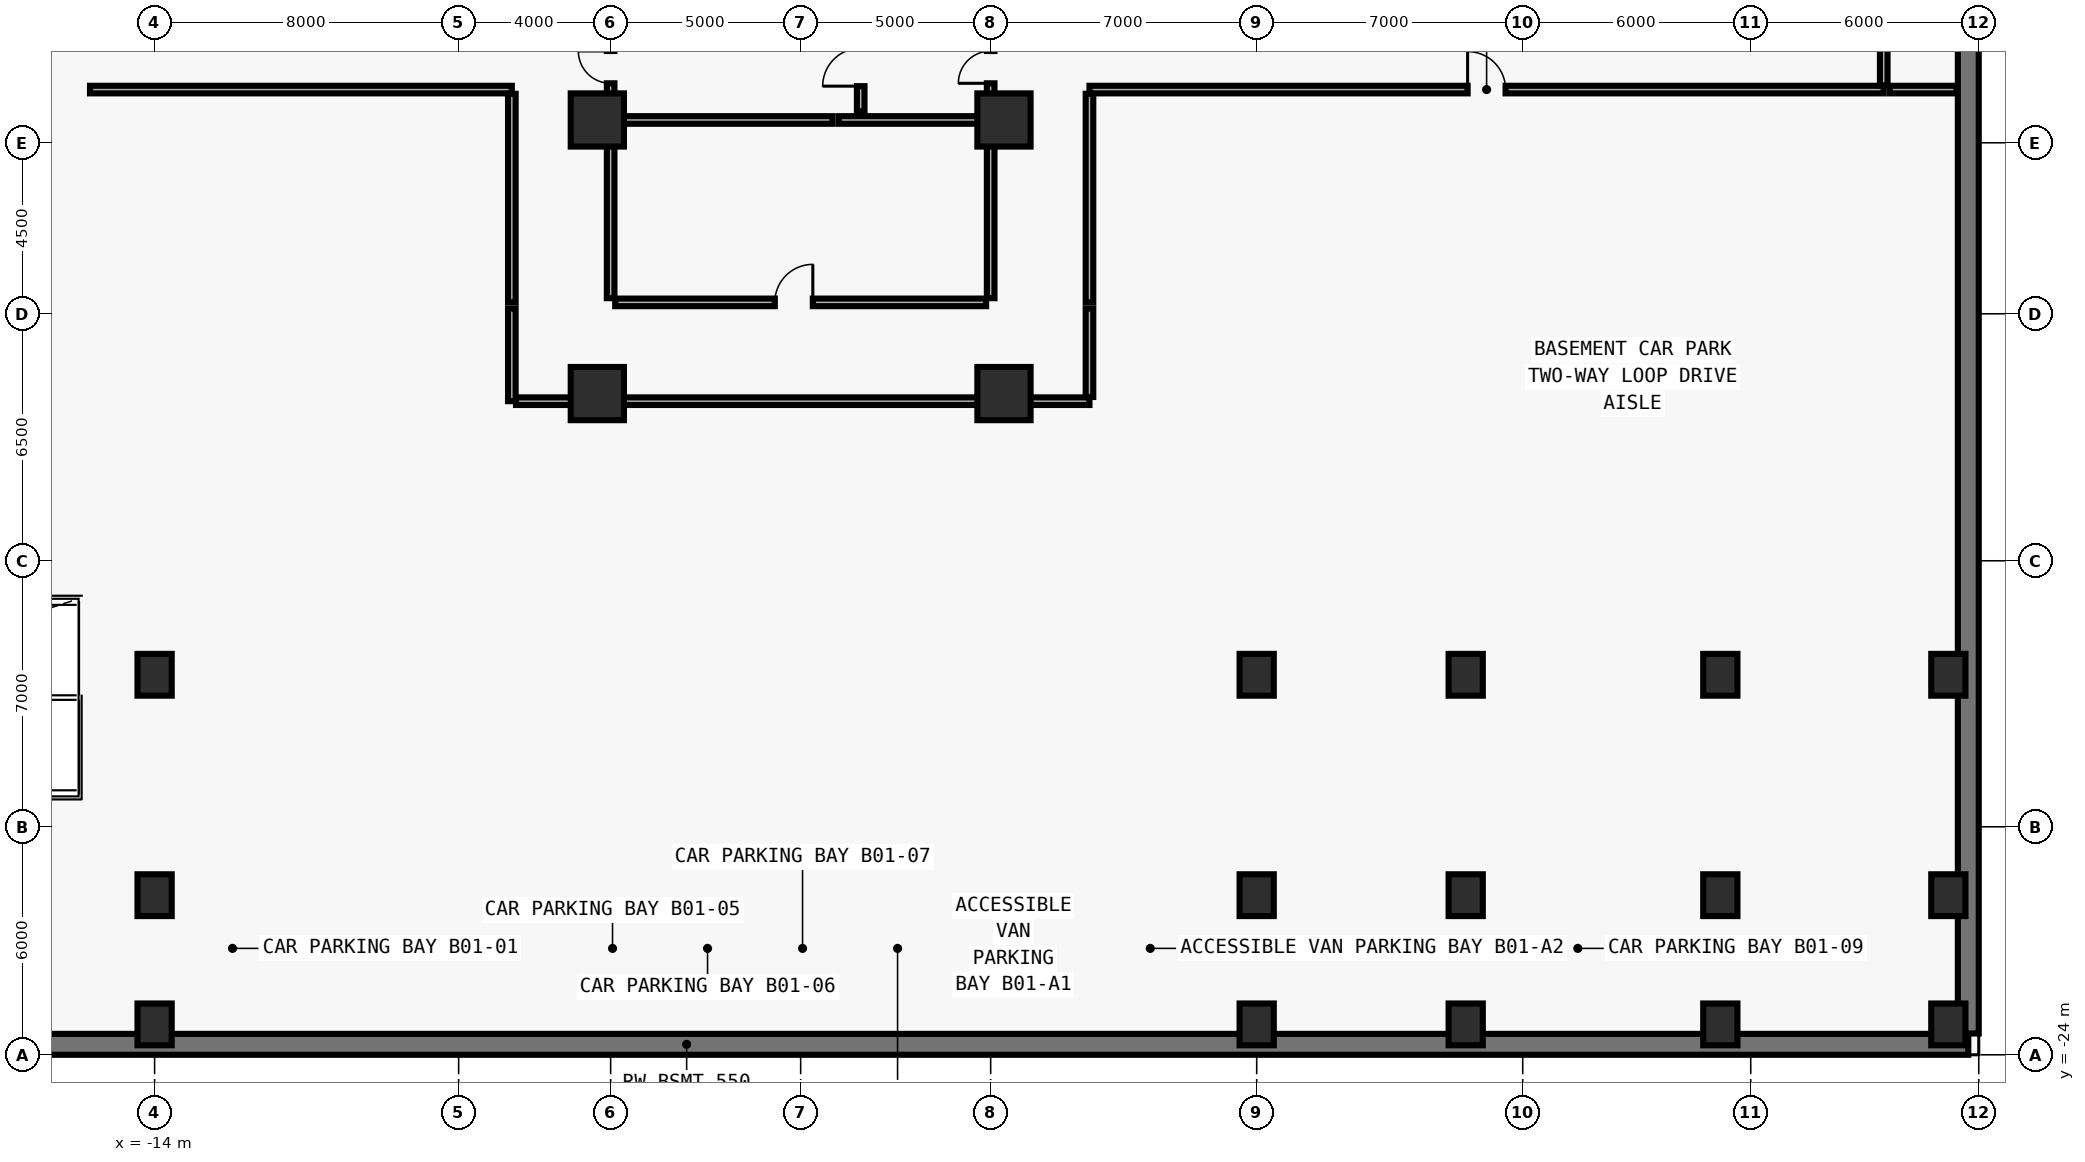
"""IFC4 building model, lengths in metres.
Left out: names, types, materials, properties, quantities, classifications, styles, units other than length and angle.
Written with IfcOpenShell. Run it as: python <this file> out.ifc"""

import sys

from ifc_helpers import new_model, si_unit, direction, frame, frame_2d, origin, origin_2d, place, context, subcontext, project, spatial, rectangle, extrude, element, fill, save


model = new_model("IFC4")
c1 = context("Model", 3, precision=1e-05, world=origin(), true_north=direction((0.0, 1.0)))
c2 = subcontext(c1, "Body", "Model", "MODEL_VIEW")
j1 = project(units=[si_unit("LENGTHUNIT", "METRE"), si_unit("PLANEANGLEUNIT", "RADIAN")], contexts=[c1])
p1 = place(None, origin())
s1 = spatial("IfcSite", under=j1, at=p1, CompositionType="ELEMENT")
p2 = place(p1, origin())
s2 = spatial("IfcBuilding", under=s1, at=p2, CompositionType="ELEMENT")
p3 = place(p2, frame((0.0, 0.0, -4.5)))
s3 = spatial("IfcBuildingStorey", under=s2, at=p3, CompositionType="ELEMENT", Elevation=-4.5)
p4 = place(p3, frame((-33.725, -23.725, 0.0), z_axis=(0.0, 0.0, 1.0), x_axis=(1.0, 0.0, 0.0)))
e1 = element("IfcWall", 1, at=p4, inside=s3, PredefinedType="SOLIDWALL", context=c2, shape_type="SweptSolid", body=[
    extrude(rectangle(XDim=67.45, YDim=0.55, at=frame_2d((33.725, 0.0))), origin(), (0.0, 0.0, 1.0), 4.492),
])
p5 = place(p3, frame((33.725, -23.44, 0.0), z_axis=(0.0, 0.0, 1.0), x_axis=(0.0, 1.0, 0.0)))
e2 = element("IfcWall", 2, at=p5, inside=s3, PredefinedType="SOLIDWALL", context=c2, shape_type="SweptSolid", body=[
    extrude(rectangle(XDim=46.88, YDim=0.55, at=frame_2d((23.44, 0.0))), origin(), (0.0, 0.0, 1.0), 4.492),
])
for number, where, z_axis, x_axis in (
    (3, (-2.35, 0.6, 0.0), (0.0, 0.0, 1.0), (1.0, 0.0, 0.0)),
    (4, (8.35, 0.6, 0.0), (0.0, 0.0, 1.0), (1.0, 0.0, 0.0)),
    (5, (-2.35, -6.6, 0.0), (0.0, 0.0, 1.0), (1.0, 0.0, 0.0)),
    (6, (8.35, -6.6, 0.0), (0.0, 0.0, 1.0), (1.0, 0.0, 0.0)),
):
    element("IfcColumn", number, at=place(p3, frame(where, z_axis=z_axis, x_axis=x_axis)), inside=s3, PredefinedType="COLUMN", context=c2, shape_type="SweptSolid", body=[
        extrude(rectangle(XDim=1.4, YDim=1.4, at=origin_2d()), origin(), (0.0, 0.0, 1.0), 4.475),
    ])
for number, where, z_axis, x_axis in (
    (7, (-14.0, -23.2, 0.0), (0.0, 0.0, 1.0), (1.0, 0.0, 0.0)),
    (8, (-14.0, -19.8, 0.0), (0.0, 0.0, 1.0), (1.0, 0.0, 0.0)),
    (9, (-14.0, -14.0, 0.0), (0.0, 0.0, 1.0), (1.0, 0.0, 0.0)),
    (10, (15.0, -23.2, 0.0), (0.0, 0.0, 1.0), (1.0, 0.0, 0.0)),
    (11, (15.0, -19.8, 0.0), (0.0, 0.0, 1.0), (1.0, 0.0, 0.0)),
    (12, (15.0, -14.0, 0.0), (0.0, 0.0, 1.0), (1.0, 0.0, 0.0)),
    (13, (20.5, -23.2, 0.0), (0.0, 0.0, 1.0), (1.0, 0.0, 0.0)),
    (14, (20.5, -19.8, 0.0), (0.0, 0.0, 1.0), (1.0, 0.0, 0.0)),
    (15, (20.5, -14.0, 0.0), (0.0, 0.0, 1.0), (1.0, 0.0, 0.0)),
    (16, (27.2, -23.2, 0.0), (0.0, 0.0, 1.0), (1.0, 0.0, 0.0)),
    (17, (27.2, -19.8, 0.0), (0.0, 0.0, 1.0), (1.0, 0.0, 0.0)),
    (18, (27.2, -14.0, 0.0), (0.0, 0.0, 1.0), (1.0, 0.0, 0.0)),
    (19, (33.2, -23.2, 0.0), (0.0, 0.0, 1.0), (1.0, 0.0, 0.0)),
    (20, (33.2, -19.8, 0.0), (0.0, 0.0, 1.0), (1.0, 0.0, 0.0)),
    (21, (33.2, -14.0, 0.0), (0.0, 0.0, 1.0), (1.0, 0.0, 0.0)),
):
    element("IfcColumn", number, at=place(p3, frame(where, z_axis=z_axis, x_axis=x_axis)), inside=s3, PredefinedType="COLUMN", context=c2, shape_type="SweptSolid", body=[
        extrude(rectangle(XDim=0.9, YDim=1.1, at=origin_2d()), origin(), (0.0, 0.0, 1.0), 4.475),
    ])
p6 = place(p3, frame((4.0, 0.6, 0.0), z_axis=(0.0, 0.0, 1.0), x_axis=(1.0, 0.0, 0.0)))
e22 = element("IfcWall", 22, at=p6, inside=s3, PredefinedType="SOLIDWALL", context=c2, shape_type="SweptSolid", body=[
    extrude(rectangle(XDim=3.88, YDim=0.2, at=frame_2d((1.94, 0.0))), origin(), (0.0, 0.0, 1.0), 3.362),
])
p7 = place(p3, frame((4.58, 0.83, 0.0), z_axis=(0.0, 0.0, 1.0), x_axis=(0.0, 1.0, 0.0)))
e23 = element("IfcWall", 23, at=p7, inside=s3, PredefinedType="MOVABLE", context=c2, shape_type="SweptSolid", body=[
    extrude(rectangle(XDim=2.14, YDim=0.2, at=frame_2d((1.07, 0.0))), origin(), (0.0, 0.0, 1.0), 4.18),
])
p8 = place(p7, frame((0.66, 0.0, 0.0)))
e24 = element("IfcOpeningElement", 24, at=p8, cuts=e23, PredefinedType="OPENING", context=c2, shape_type="SweptSolid", body=[
    extrude(rectangle(XDim=1.0, YDim=2.1, at=frame_2d((0.5, 1.05))), frame((0.0, 0.11, 0.0), z_axis=(0.0, -1.0, 0.0), x_axis=(1.0, 0.0, 0.0)), (0.0, 0.0, 1.0), 0.22),
])
p9 = place(p3, frame((-2.0, 0.72, 0.0), z_axis=(0.0, 0.0, 1.0), x_axis=(0.0, 1.0, 0.0)))
e25 = element("IfcWall", 25, at=p9, inside=s3, PredefinedType="MOVABLE", context=c2, shape_type="SweptSolid", body=[
    extrude(rectangle(XDim=2.25, YDim=0.2, at=frame_2d((1.125, 0.0))), origin(), (0.0, 0.0, 1.0), 3.262),
])
p10 = place(p9, frame((0.845, 0.0, 0.0)))
e26 = element("IfcOpeningElement", 26, at=p10, cuts=e25, PredefinedType="OPENING", context=c2, shape_type="SweptSolid", body=[
    extrude(rectangle(XDim=0.85, YDim=2.1, at=frame_2d((0.425, 1.05))), frame((0.0, 0.11, 0.0), z_axis=(0.0, -1.0, 0.0), x_axis=(1.0, 0.0, 0.0)), (0.0, 0.0, 1.0), 0.22),
])
p11 = place(p3, frame((8.0, 0.72, 0.0), z_axis=(0.0, 0.0, 1.0), x_axis=(0.0, 1.0, 0.0)))
e27 = element("IfcWall", 27, at=p11, inside=s3, PredefinedType="MOVABLE", context=c2, shape_type="SweptSolid", body=[
    extrude(rectangle(XDim=2.25, YDim=0.2, at=frame_2d((1.125, 0.0))), origin(), (0.0, 0.0, 1.0), 3.262),
])
p12 = place(p11, frame((0.845, 0.0, 0.0)))
e28 = element("IfcOpeningElement", 28, at=p12, cuts=e27, PredefinedType="OPENING", context=c2, shape_type="SweptSolid", body=[
    extrude(rectangle(XDim=0.85, YDim=2.1, at=frame_2d((0.425, 1.05))), frame((0.0, 0.11, 0.0), z_axis=(0.0, -1.0, 0.0), x_axis=(1.0, 0.0, 0.0)), (0.0, 0.0, 1.0), 0.22),
])
p13 = place(p3, frame((-1.88, -4.2, 0.0), z_axis=(0.0, 0.0, 1.0), x_axis=(1.0, 0.0, 0.0)))
e29 = element("IfcWall", 29, at=p13, inside=s3, PredefinedType="MOVABLE", context=c2, shape_type="SweptSolid", body=[
    extrude(rectangle(XDim=9.76, YDim=0.2, at=frame_2d((4.88, 0.0))), origin(), (0.0, 0.0, 1.0), 4.18),
])
p14 = place(p13, frame((4.2, 0.0, 0.0)))
e30 = element("IfcOpeningElement", 30, at=p14, cuts=e29, PredefinedType="OPENING", context=c2, shape_type="SweptSolid", body=[
    extrude(rectangle(XDim=1.0, YDim=2.1, at=frame_2d((0.5, 1.05))), frame((0.0, 0.11, 0.0), z_axis=(0.0, -1.0, 0.0), x_axis=(1.0, 0.0, 0.0)), (0.0, 0.0, 1.0), 0.22),
])
p15 = place(p3, frame((10.6, 1.4, 0.0), z_axis=(0.0, 0.0, 1.0), x_axis=(1.0, 0.0, 0.0)))
e31 = element("IfcWall", 31, at=p15, inside=s3, PredefinedType="MOVABLE", context=c2, shape_type="SweptSolid", body=[
    extrude(rectangle(XDim=20.9, YDim=0.2, at=frame_2d((10.45, 0.0))), origin(), (0.0, 0.0, 1.0), 4.18),
])
p16 = place(p15, frame((9.95, 0.0, 0.0)))
e32 = element("IfcOpeningElement", 32, at=p16, cuts=e31, PredefinedType="OPENING", context=c2, shape_type="SweptSolid", body=[
    extrude(rectangle(XDim=1.0, YDim=2.1, at=frame_2d((0.5, 1.05))), frame((0.0, 0.11, 0.0), z_axis=(0.0, -1.0, 0.0), x_axis=(1.0, 0.0, 0.0)), (0.0, 0.0, 1.0), 0.22),
])
p17 = place(p3, frame((-1.88, 0.6, 0.0), z_axis=(0.0, 0.0, 1.0), x_axis=(1.0, 0.0, 0.0)))
e33 = element("IfcWall", 33, at=p17, inside=s3, PredefinedType="MOVABLE", context=c2, shape_type="SweptSolid", body=[
    extrude(rectangle(XDim=5.72, YDim=0.2, at=frame_2d((2.86, 0.0))), origin(), (0.0, 0.0, 1.0), 3.362),
])
for number, where, z_axis, x_axis in (
    (34, (-2.0, -4.09, 0.0), (0.0, 0.0, 1.0), (0.0, 1.0, 0.0)),
    (35, (8.0, -4.09, 0.0), (0.0, 0.0, 1.0), (0.0, 1.0, 0.0)),
):
    element("IfcWall", number, at=place(p3, frame(where, z_axis=z_axis, x_axis=x_axis)), inside=s3, PredefinedType="MOVABLE", context=c2, shape_type="SweptSolid", body=[
        extrude(rectangle(XDim=4.59, YDim=0.2, at=frame_2d((2.295, 0.0))), origin(), (0.0, 0.0, 1.0), 3.362),
    ])
p18 = place(p3, frame((-15.7, 1.4, 0.0), z_axis=(0.0, 0.0, 1.0), x_axis=(1.0, 0.0, 0.0)))
e36 = element("IfcWall", 36, at=p18, inside=s3, PredefinedType="MOVABLE", context=c2, shape_type="SweptSolid", body=[
    extrude(rectangle(XDim=11.1, YDim=0.2, at=frame_2d((5.55, 0.0))), origin(), (0.0, 0.0, 1.0), 4.18),
])
p19 = place(p3, frame((-2.0, -6.8, 0.0), z_axis=(0.0, 0.0, 1.0), x_axis=(1.0, 0.0, 0.0)))
e37 = element("IfcWall", 37, at=p19, inside=s3, PredefinedType="MOVABLE", context=c2, shape_type="SweptSolid", body=[
    extrude(rectangle(XDim=10.0, YDim=0.2, at=frame_2d((5.0, 0.0))), origin(), (0.0, 0.0, 1.0), 3.362),
])
for number, where, z_axis, x_axis in (
    (38, (-4.6, 1.29, 0.0), (0.0, 0.0, 1.0), (0.0, -1.0, 0.0)),
    (39, (10.6, -4.2, 0.0), (0.0, 0.0, 1.0), (0.0, 1.0, 0.0)),
):
    element("IfcWall", number, at=place(p3, frame(where, z_axis=z_axis, x_axis=x_axis)), inside=s3, PredefinedType="MOVABLE", context=c2, shape_type="SweptSolid", body=[
        extrude(rectangle(XDim=5.49, YDim=0.2, at=frame_2d((2.745, 0.0))), origin(), (0.0, 0.0, 1.0), 4.18),
    ])
p20 = place(p3, frame((-4.6, -4.36, 0.0), z_axis=(0.0, 0.0, 1.0), x_axis=(0.0, -1.0, 0.0)))
e40 = element("IfcWall", 40, at=p20, inside=s3, PredefinedType="MOVABLE", context=c2, shape_type="SweptSolid", body=[
    extrude(rectangle(XDim=2.44, YDim=0.2, at=frame_2d((1.22, 0.0))), origin(), (0.0, 0.0, 1.0), 4.18),
])
p21 = place(p3, frame((-4.49, -6.8, 0.0), z_axis=(0.0, 0.0, 1.0), x_axis=(1.0, 0.0, 0.0)))
e41 = element("IfcWall", 41, at=p21, inside=s3, PredefinedType="MOVABLE", context=c2, shape_type="SweptSolid", body=[
    extrude(rectangle(XDim=2.33, YDim=0.2, at=frame_2d((1.165, 0.0))), origin(), (0.0, 0.0, 1.0), 4.18),
])
p22 = place(p3, frame((8.16, -6.8, 0.0), z_axis=(0.0, 0.0, 1.0), x_axis=(1.0, 0.0, 0.0)))
e42 = element("IfcWall", 42, at=p22, inside=s3, PredefinedType="MOVABLE", context=c2, shape_type="SweptSolid", body=[
    extrude(rectangle(XDim=2.44, YDim=0.2, at=frame_2d((1.22, 0.0))), origin(), (0.0, 0.0, 1.0), 4.18),
])
p23 = place(p3, frame((10.6, -6.69, 0.0), z_axis=(0.0, 0.0, 1.0), x_axis=(0.0, 1.0, 0.0)))
e43 = element("IfcWall", 43, at=p23, inside=s3, PredefinedType="MOVABLE", context=c2, shape_type="SweptSolid", body=[
    extrude(rectangle(XDim=2.33, YDim=0.2, at=frame_2d((1.165, 0.0))), origin(), (0.0, 0.0, 1.0), 4.18),
])
p24 = place(p3, frame((31.5, 1.51, 0.0), z_axis=(0.0, 0.0, 1.0), x_axis=(0.0, 1.0, 0.0)))
e44 = element("IfcWall", 44, at=p24, inside=s3, PredefinedType="MOVABLE", context=c2, shape_type="SweptSolid", body=[
    extrude(rectangle(XDim=2.18, YDim=0.2, at=frame_2d((1.09, 0.0))), origin(), (0.0, 0.0, 1.0), 4.18),
])
p25 = place(p3, frame((31.66, 1.4, 0.0), z_axis=(0.0, 0.0, 1.0), x_axis=(1.0, 0.0, 0.0)))
e45 = element("IfcWall", 45, at=p25, inside=s3, PredefinedType="MOVABLE", context=c2, shape_type="SweptSolid", body=[
    extrude(rectangle(XDim=1.755, YDim=0.2, at=frame_2d((0.877, 0.0))), origin(), (0.0, 0.0, 1.0), 4.18),
])
p26 = place(p8, origin())
e46 = element("IfcDoor", 46, at=p26, inside=s3, OperationType="SINGLE_SWING_LEFT", PredefinedType="DOOR", context=c2, shape_type="SweptSolid", body=[
    extrude(rectangle(XDim=1.0, YDim=2.1, at=frame_2d((0.5, 1.05))), frame((0.0, 0.025, 0.0), z_axis=(0.0, -1.0, 0.0), x_axis=(1.0, 0.0, 0.0)), (0.0, 0.0, 1.0), 0.05),
])
fill(e24, e46)
p27 = place(p10, origin())
e47 = element("IfcDoor", 47, at=p27, inside=s3, OperationType="SINGLE_SWING_RIGHT", PredefinedType="DOOR", context=c2, shape_type="SweptSolid", body=[
    extrude(rectangle(XDim=0.85, YDim=2.1, at=frame_2d((0.425, 1.05))), frame((0.0, 0.025, 0.0), z_axis=(0.0, -1.0, 0.0), x_axis=(1.0, 0.0, 0.0)), (0.0, 0.0, 1.0), 0.05),
])
fill(e26, e47)
p28 = place(p12, origin())
e48 = element("IfcDoor", 48, at=p28, inside=s3, OperationType="SINGLE_SWING_LEFT", PredefinedType="DOOR", context=c2, shape_type="SweptSolid", body=[
    extrude(rectangle(XDim=0.85, YDim=2.1, at=frame_2d((0.425, 1.05))), frame((0.0, 0.025, 0.0), z_axis=(0.0, -1.0, 0.0), x_axis=(1.0, 0.0, 0.0)), (0.0, 0.0, 1.0), 0.05),
])
fill(e28, e48)
p29 = place(p14, origin())
e49 = element("IfcDoor", 49, at=p29, inside=s3, OperationType="SINGLE_SWING_RIGHT", PredefinedType="DOOR", context=c2, shape_type="SweptSolid", body=[
    extrude(rectangle(XDim=1.0, YDim=2.1, at=frame_2d((0.5, 1.05))), frame((0.0, 0.025, 0.0), z_axis=(0.0, -1.0, 0.0), x_axis=(1.0, 0.0, 0.0)), (0.0, 0.0, 1.0), 0.05),
])
fill(e30, e49)
p30 = place(p16, origin())
e50 = element("IfcDoor", 50, at=p30, inside=s3, OperationType="SINGLE_SWING_LEFT", PredefinedType="DOOR", context=c2, shape_type="SweptSolid", body=[
    extrude(rectangle(XDim=1.0, YDim=2.1, at=frame_2d((0.5, 1.05))), frame((0.0, 0.025, 0.0), z_axis=(0.0, -1.0, 0.0), x_axis=(1.0, 0.0, 0.0)), (0.0, 0.0, 1.0), 0.05),
])
fill(e32, e50)
save(model, sys.argv[1])
